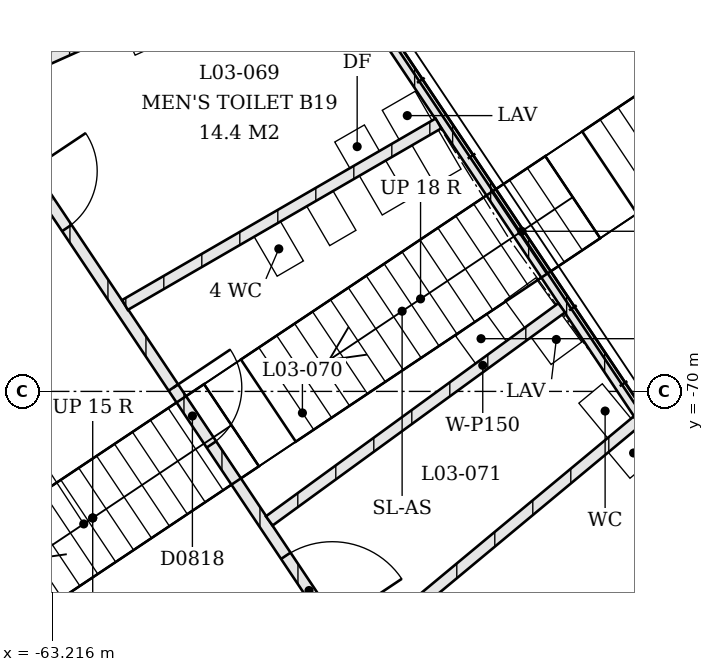
"""IFC4 building model, lengths in metres.
Left out: names, types, materials, properties, quantities, classifications, styles, units other than length and angle.
Written with IfcOpenShell. Run it as: python <this file> out.ifc"""

import sys

from ifc_helpers import new_model, si_unit, direction, frame, frame_2d, origin, place, context, subcontext, project, spatial, rectangle, extrude, element, fill, save


model = new_model("IFC4")
c1 = context("Model", 3, precision=1e-05, world=origin(), true_north=direction((0.0, 1.0)))
c2 = subcontext(c1, "Body", "Model", "MODEL_VIEW")
j1 = project(units=[si_unit("LENGTHUNIT", "METRE"), si_unit("PLANEANGLEUNIT", "RADIAN")], contexts=[c1])
p1 = place(None, origin())
s1 = spatial("IfcSite", under=j1, at=p1, CompositionType="ELEMENT")
p2 = place(p1, origin())
s2 = spatial("IfcBuilding", under=s1, at=p2, CompositionType="ELEMENT")
p3 = place(p2, frame((0.0, 0.0, 13.5)))
s3 = spatial("IfcBuildingStorey", under=s2, at=p3, CompositionType="ELEMENT", Elevation=13.5)
p4 = place(p3, frame((-59.891, -63.711, 0.0), z_axis=(0.0, 0.0, 1.0), x_axis=(0.555562437394, -0.83147482112, 0.0)))
e1 = element("IfcWall", 1, at=p4, inside=s3, PredefinedType="PARTITIONING", context=c2, shape_type="SweptSolid", body=[
    extrude(rectangle(XDim=10.125, YDim=0.15, at=frame_2d((5.062, 0.0))), origin(), (0.0, 0.0, 1.0), 3.0),
])
p5 = place(p3, frame((-64.27, -65.985, 0.0), z_axis=(0.0, 0.0, 1.0), x_axis=(0.555569460176, -0.8314701287, 0.0)))
e2 = element("IfcWall", 2, at=p5, inside=s3, PredefinedType="PARTITIONING", context=c2, shape_type="SweptSolid", body=[
    extrude(rectangle(XDim=11.209, YDim=0.15, at=frame_2d((5.604, 0.0))), origin(), (0.0, 0.0, 1.0), 3.0),
])
p6 = place(p5, frame((1.343, 0.0, 0.0)))
e3 = element("IfcOpeningElement", 3, at=p6, cuts=e2, PredefinedType="OPENING", context=c2, shape_type="SweptSolid", body=[
    extrude(rectangle(XDim=0.9, YDim=2.1, at=frame_2d((0.45, 1.05))), frame((0.0, 0.075, 0.0), z_axis=(0.0, -1.0, 0.0), x_axis=(1.0, 0.0, 0.0)), (0.0, 0.0, 1.0), 0.15),
])
p7 = place(p5, frame((4.768, 0.0, 0.0)))
e4 = element("IfcOpeningElement", 4, at=p7, cuts=e2, PredefinedType="OPENING", context=c2, shape_type="SweptSolid", body=[
    extrude(rectangle(XDim=0.9, YDim=2.1, at=frame_2d((0.45, 1.05))), frame((0.0, 0.075, 0.0), z_axis=(0.0, -1.0, 0.0), x_axis=(1.0, 0.0, 0.0)), (0.0, 0.0, 1.0), 0.15),
])
p8 = place(p5, frame((7.43, 0.0, 0.0)))
e5 = element("IfcOpeningElement", 5, at=p8, cuts=e2, PredefinedType="OPENING", context=c2, shape_type="SweptSolid", body=[
    extrude(rectangle(XDim=1.1, YDim=2.1, at=frame_2d((0.55, 1.05))), frame((0.0, 0.075, 0.0), z_axis=(0.0, -1.0, 0.0), x_axis=(1.0, 0.0, 0.0)), (0.0, 0.0, 1.0), 0.15),
])
p9 = place(p5, frame((9.529, 0.0, 0.0)))
e6 = element("IfcOpeningElement", 6, at=p9, cuts=e2, PredefinedType="OPENING", context=c2, shape_type="SweptSolid", body=[
    extrude(rectangle(XDim=1.1, YDim=2.1, at=frame_2d((0.55, 1.05))), frame((0.0, 0.075, 0.0), z_axis=(0.0, -1.0, 0.0), x_axis=(1.0, 0.0, 0.0)), (0.0, 0.0, 1.0), 0.15),
])
p10 = place(p3, frame((-59.754, -64.048, 0.0), z_axis=(0.0, 0.0, 1.0), x_axis=(-0.912468935825, -0.409145990025, 0.0)))
e7 = element("IfcWall", 7, at=p10, inside=s3, PredefinedType="PARTITIONING", context=c2, shape_type="SweptSolid", body=[
    extrude(rectangle(XDim=4.824, YDim=0.15, at=frame_2d((2.412, 0.0))), origin(), (0.0, 0.0, 1.0), 3.0),
])
p11 = place(p3, frame((-58.133, -66.474, 0.0), z_axis=(0.0, 0.0, 1.0), x_axis=(-0.865401737421, -0.501078669341, 0.0)))
e8 = element("IfcWall", 8, at=p11, inside=s3, PredefinedType="PARTITIONING", context=c2, shape_type="SweptSolid", body=[
    extrude(rectangle(XDim=4.767, YDim=0.15, at=frame_2d((2.383, 0.0))), origin(), (0.0, 0.0, 1.0), 3.0),
])
p12 = place(p3, frame((-56.512, -68.901, 0.0), z_axis=(0.0, 0.0, 1.0), x_axis=(-0.808261251336, -0.588824039581, 0.0)))
e9 = element("IfcWall", 9, at=p12, inside=s3, PredefinedType="PARTITIONING", context=c2, shape_type="SweptSolid", body=[
    extrude(rectangle(XDim=4.761, YDim=0.15, at=frame_2d((2.38, 0.0))), origin(), (0.0, 0.0, 1.0), 3.0),
])
p13 = place(p3, frame((-55.518, -70.388, 0.0), z_axis=(0.0, 0.0, 1.0), x_axis=(-0.769023985067, -0.639219923337, 0.0)))
e10 = element("IfcWall", 10, at=p13, inside=s3, PredefinedType="PARTITIONING", context=c2, shape_type="SweptSolid", body=[
    extrude(rectangle(XDim=4.783, YDim=0.15, at=frame_2d((2.392, 0.0))), origin(), (0.0, 0.0, 1.0), 3.0),
])
p14 = place(p3, frame((-54.525, -71.875, 0.0), z_axis=(0.0, 0.0, 1.0), x_axis=(-0.727182951144, -0.686443701672, 0.0)))
e11 = element("IfcWall", 11, at=p14, inside=s3, PredefinedType="PARTITIONING", context=c2, shape_type="SweptSolid", body=[
    extrude(rectangle(XDim=4.824, YDim=0.15, at=frame_2d((2.412, 0.0))), origin(), (0.0, 0.0, 1.0), 3.0),
])
p15 = place(p6, origin())
e12 = element("IfcDoor", 12, at=p15, inside=s3, OperationType="SINGLE_SWING_RIGHT", PredefinedType="DOOR", context=c2, shape_type="SweptSolid", body=[
    extrude(rectangle(XDim=0.9, YDim=2.1, at=frame_2d((0.45, 1.05))), frame((0.0, 0.025, 0.0), z_axis=(0.0, -1.0, 0.0), x_axis=(1.0, 0.0, 0.0)), (0.0, 0.0, 1.0), 0.05),
])
fill(e3, e12)
p16 = place(p7, origin())
e13 = element("IfcDoor", 13, at=p16, inside=s3, OperationType="SINGLE_SWING_RIGHT", PredefinedType="DOOR", context=c2, shape_type="SweptSolid", body=[
    extrude(rectangle(XDim=0.9, YDim=2.1, at=frame_2d((0.45, 1.05))), frame((0.0, 0.025, 0.0), z_axis=(0.0, -1.0, 0.0), x_axis=(1.0, 0.0, 0.0)), (0.0, 0.0, 1.0), 0.05),
])
fill(e4, e13)
p17 = place(p8, origin())
e14 = element("IfcDoor", 14, at=p17, inside=s3, OperationType="SINGLE_SWING_LEFT", PredefinedType="DOOR", context=c2, shape_type="SweptSolid", body=[
    extrude(rectangle(XDim=1.1, YDim=2.1, at=frame_2d((0.55, 1.05))), frame((0.0, 0.025, 0.0), z_axis=(0.0, -1.0, 0.0), x_axis=(1.0, 0.0, 0.0)), (0.0, 0.0, 1.0), 0.05),
])
fill(e5, e14)
save(model, sys.argv[1])
